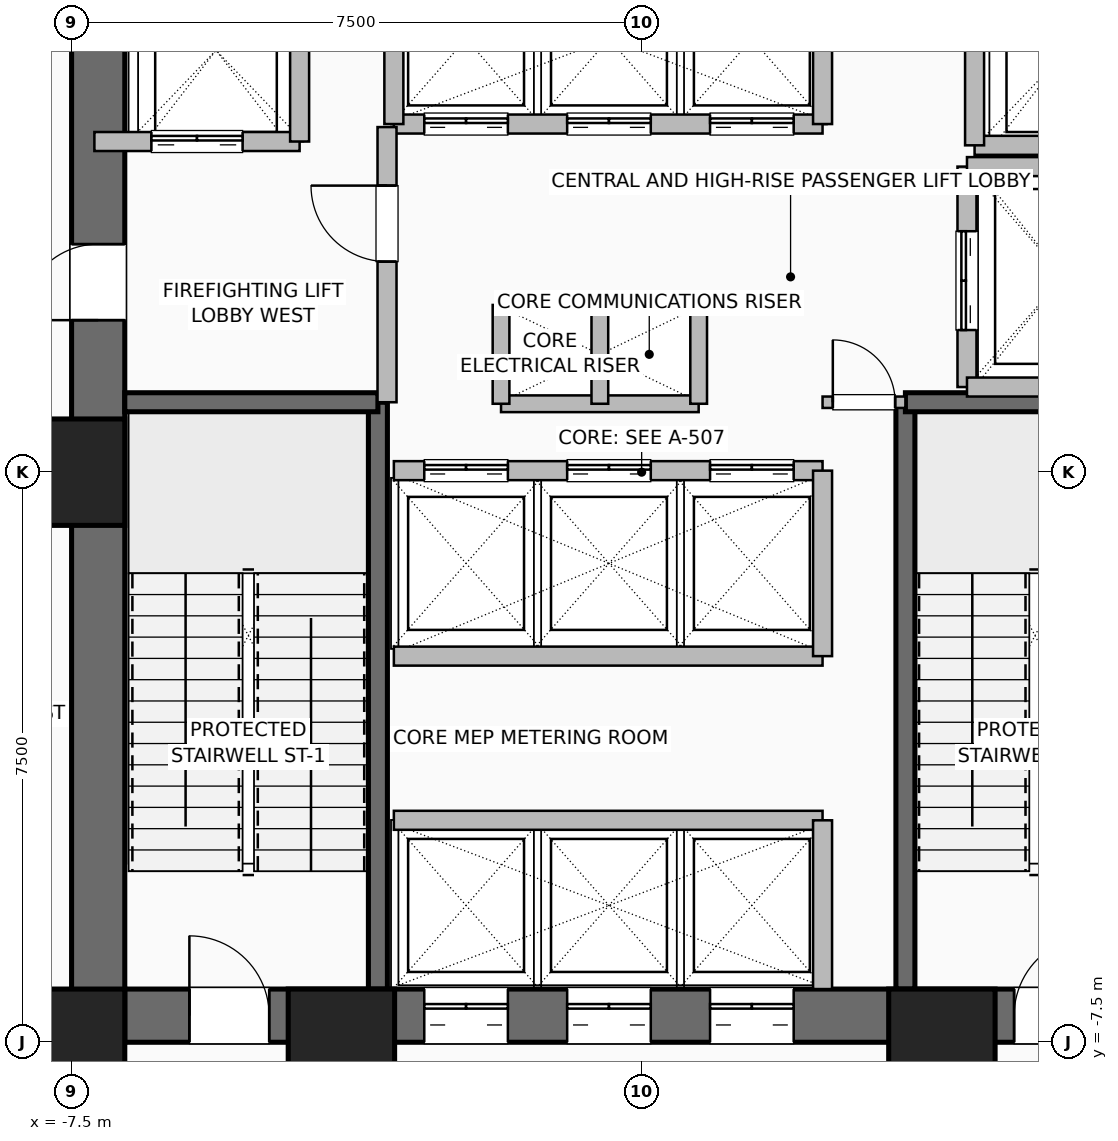
"""IFC4 building model, lengths in metres.
Left out: names, types, materials, properties, quantities, classifications, styles, units other than length and angle.
Written with IfcOpenShell. Run it as: python <this file> out.ifc"""

import sys

from ifc_helpers import new_model, si_unit, direction, frame, frame_2d, origin, origin_2d, place, context, subcontext, project, spatial, rectangle, hollow_rectangle, extrude, element, fill, save


model = new_model("IFC4")
c1 = context("Model", 3, precision=1e-05, world=origin(), true_north=direction((0.0, 1.0)))
c2 = subcontext(c1, "Body", "Model", "MODEL_VIEW")
j1 = project(units=[si_unit("LENGTHUNIT", "METRE"), si_unit("PLANEANGLEUNIT", "RADIAN")], contexts=[c1])
p1 = place(None, origin())
s1 = spatial("IfcSite", under=j1, at=p1, CompositionType="ELEMENT")
p2 = place(p1, origin())
s2 = spatial("IfcBuilding", under=s1, at=p2, CompositionType="ELEMENT")
p3 = place(p2, frame((0.0, 0.0, 21.6)))
s3 = spatial("IfcBuildingStorey", under=s2, at=p3, CompositionType="ELEMENT", Elevation=21.6)
for number, where, z_axis, x_axis in (
    (1, (-7.5, -7.5, 0.0), (0.0, 0.0, 1.0), (1.0, 0.0, 0.0)),
    (2, (-3.95, -7.5, 0.0), (0.0, 0.0, 1.0), (1.0, 0.0, 0.0)),
    (3, (3.95, -7.5, 0.0), (0.0, 0.0, 1.0), (1.0, 0.0, 0.0)),
    (4, (-7.5, 0.0, 0.0), (0.0, 0.0, 1.0), (1.0, 0.0, 0.0)),
):
    element("IfcColumn", number, at=place(p3, frame(where, z_axis=z_axis, x_axis=x_axis)), inside=s3, PredefinedType="COLUMN", context=c2, shape_type="SweptSolid", body=[
        extrude(hollow_rectangle(XDim=1.4, YDim=1.4, WallThickness=0.06, at=origin_2d()), origin(), (0.0, 0.0, 1.0), 5.4),
    ])
p4 = place(p3, frame((-7.5, -7.15, 0.0), z_axis=(0.0, 0.0, 1.0), x_axis=(1.0, 0.0, 0.0)))
e5 = element("IfcWall", 5, at=p4, inside=s3, PredefinedType="SHEAR", context=c2, shape_type="SweptSolid", body=[
    extrude(rectangle(XDim=15.0, YDim=0.7, at=frame_2d((7.5, 0.0))), origin(), (0.0, 0.0, 1.0), 5.0),
])
p5 = place(p4, frame((1.55, 0.0, 0.0)))
e6 = element("IfcOpeningElement", 6, at=p5, cuts=e5, PredefinedType="OPENING", context=c2, shape_type="SweptSolid", body=[
    extrude(rectangle(XDim=1.05, YDim=2.08, at=frame_2d((0.525, 1.04))), frame((0.0, 0.36, 0.0), z_axis=(0.0, -1.0, 0.0), x_axis=(1.0, 0.0, 0.0)), (0.0, 0.0, 1.0), 0.72),
])
p6 = place(p4, frame((12.4, 0.0, 0.0)))
e7 = element("IfcOpeningElement", 7, at=p6, cuts=e5, PredefinedType="OPENING", context=c2, shape_type="SweptSolid", body=[
    extrude(rectangle(XDim=1.05, YDim=2.08, at=frame_2d((0.525, 1.04))), frame((0.0, 0.36, 0.0), z_axis=(0.0, -1.0, 0.0), x_axis=(1.0, 0.0, 0.0)), (0.0, 0.0, 1.0), 0.72),
])
p7 = place(p4, frame((4.64, 0.0, 0.0)))
e8 = element("IfcOpeningElement", 8, at=p7, cuts=e5, PredefinedType="OPENING", context=c2, shape_type="SweptSolid", body=[
    extrude(rectangle(XDim=1.1, YDim=2.2, at=frame_2d((0.55, 1.1))), frame((0.0, 0.36, 0.0), z_axis=(0.0, -1.0, 0.0), x_axis=(1.0, 0.0, 0.0)), (0.0, 0.0, 1.0), 0.72),
])
p8 = place(p4, frame((6.52, 0.0, 0.0)))
e9 = element("IfcOpeningElement", 9, at=p8, cuts=e5, PredefinedType="OPENING", context=c2, shape_type="SweptSolid", body=[
    extrude(rectangle(XDim=1.1, YDim=2.2, at=frame_2d((0.55, 1.1))), frame((0.0, 0.36, 0.0), z_axis=(0.0, -1.0, 0.0), x_axis=(1.0, 0.0, 0.0)), (0.0, 0.0, 1.0), 0.72),
])
p9 = place(p4, frame((8.4, 0.0, 0.0)))
e10 = element("IfcOpeningElement", 10, at=p9, cuts=e5, PredefinedType="OPENING", context=c2, shape_type="SweptSolid", body=[
    extrude(rectangle(XDim=1.1, YDim=2.2, at=frame_2d((0.55, 1.1))), frame((0.0, 0.36, 0.0), z_axis=(0.0, -1.0, 0.0), x_axis=(1.0, 0.0, 0.0)), (0.0, 0.0, 1.0), 0.72),
])
p10 = place(p3, frame((-7.15, -7.5, 0.0), z_axis=(0.0, 0.0, 1.0), x_axis=(0.0, 1.0, 0.0)))
e11 = element("IfcWall", 11, at=p10, inside=s3, PredefinedType="SHEAR", context=c2, shape_type="SweptSolid", body=[
    extrude(rectangle(XDim=15.0, YDim=0.7, at=frame_2d((7.5, 0.0))), origin(), (0.0, 0.0, 1.0), 5.0),
])
p11 = place(p10, frame((9.5, 0.0, 0.0)))
e12 = element("IfcOpeningElement", 12, at=p11, cuts=e11, PredefinedType="OPENING", context=c2, shape_type="SweptSolid", body=[
    extrude(rectangle(XDim=1.0, YDim=2.08, at=frame_2d((0.5, 1.04))), frame((0.0, 0.36, 0.0), z_axis=(0.0, -1.0, 0.0), x_axis=(1.0, 0.0, 0.0)), (0.0, 0.0, 1.0), 0.72),
])
p12 = place(p3, frame((-3.47, -6.8, 0.0), z_axis=(0.0, 0.0, 1.0), x_axis=(0.0, 1.0, 0.0)))
e13 = element("IfcWall", 13, at=p12, inside=s3, PredefinedType="SHEAR", context=c2, shape_type="SweptSolid", body=[
    extrude(rectangle(XDim=7.72, YDim=0.25, at=frame_2d((3.86, 0.0))), origin(), (0.0, 0.0, 1.0), 5.0),
])
p13 = place(p3, frame((-6.8, 0.92, 0.0), z_axis=(0.0, 0.0, 1.0), x_axis=(1.0, 0.0, 0.0)))
e14 = element("IfcWall", 14, at=p13, inside=s3, PredefinedType="SHEAR", context=c2, shape_type="SweptSolid", body=[
    extrude(rectangle(XDim=3.33, YDim=0.25, at=frame_2d((1.665, 0.0))), origin(), (0.0, 0.0, 1.0), 5.0),
])
p14 = place(p3, frame((3.47, -6.8, 0.0), z_axis=(0.0, 0.0, 1.0), x_axis=(0.0, 1.0, 0.0)))
e15 = element("IfcWall", 15, at=p14, inside=s3, PredefinedType="SHEAR", context=c2, shape_type="SweptSolid", body=[
    extrude(rectangle(XDim=7.72, YDim=0.25, at=frame_2d((3.86, 0.0))), origin(), (0.0, 0.0, 1.0), 5.0),
])
p15 = place(p3, frame((3.47, 0.92, 0.0), z_axis=(0.0, 0.0, 1.0), x_axis=(1.0, 0.0, 0.0)))
e16 = element("IfcWall", 16, at=p15, inside=s3, PredefinedType="SHEAR", context=c2, shape_type="SweptSolid", body=[
    extrude(rectangle(XDim=3.33, YDim=0.25, at=frame_2d((1.665, 0.0))), origin(), (0.0, 0.0, 1.0), 5.0),
])
for number, where, z_axis, x_axis in (
    (17, (-1.85, 2.2, 0.0), (0.0, 0.0, 1.0), (1.0, 0.0, 0.0)),
    (18, (-1.85, 0.9, 0.0), (0.0, 0.0, 1.0), (1.0, 0.0, 0.0)),
):
    element("IfcWall", number, at=place(p3, frame(where, z_axis=z_axis, x_axis=x_axis)), inside=s3, PredefinedType="PARTITIONING", context=c2, shape_type="SweptSolid", body=[
        extrude(rectangle(XDim=2.6, YDim=0.22, at=frame_2d((1.3, 0.0))), origin(), (0.0, 0.0, 1.0), 5.0),
    ])
for number, where, z_axis, x_axis in (
    (19, (-0.55, 0.9, 0.0), (0.0, 0.0, 1.0), (0.0, 1.0, 0.0)),
    (20, (0.75, 0.9, 0.0), (0.0, 0.0, 1.0), (0.0, 1.0, 0.0)),
    (21, (-1.85, 0.9, 0.0), (0.0, 0.0, 1.0), (0.0, 1.0, 0.0)),
):
    element("IfcWall", number, at=place(p3, frame(where, z_axis=z_axis, x_axis=x_axis)), inside=s3, PredefinedType="PARTITIONING", context=c2, shape_type="SweptSolid", body=[
        extrude(rectangle(XDim=1.3, YDim=0.22, at=frame_2d((0.65, 0.0))), origin(), (0.0, 0.0, 1.0), 5.0),
    ])
p16 = place(p3, frame((-3.26, -4.58, 0.0), z_axis=(0.0, 0.0, 1.0), x_axis=(1.0, 0.0, 0.0)))
e22 = element("IfcWall", 22, at=p16, inside=s3, PredefinedType="SHEAR", context=c2, shape_type="SweptSolid", body=[
    extrude(rectangle(XDim=5.64, YDim=0.25, at=frame_2d((2.82, 0.0))), origin(), (0.0, 0.0, 1.0), 5.0),
])
p17 = place(p3, frame((2.38, -6.8, 0.0), z_axis=(0.0, 0.0, 1.0), x_axis=(0.0, 1.0, 0.0)))
e23 = element("IfcWall", 23, at=p17, inside=s3, PredefinedType="SHEAR", context=c2, shape_type="SweptSolid", body=[
    extrude(rectangle(XDim=2.22, YDim=0.25, at=frame_2d((1.11, 0.0))), origin(), (0.0, 0.0, 1.0), 5.0),
])
p18 = place(p3, frame((-3.26, 0.02, 0.0), z_axis=(0.0, 0.0, 1.0), x_axis=(1.0, 0.0, 0.0)))
e24 = element("IfcWall", 24, at=p18, inside=s3, PredefinedType="SHEAR", context=c2, shape_type="SweptSolid", body=[
    extrude(rectangle(XDim=5.64, YDim=0.25, at=frame_2d((2.82, 0.0))), origin(), (0.0, 0.0, 1.0), 5.0),
])
p19 = place(p18, frame((0.4, 0.0, 0.0)))
e25 = element("IfcOpeningElement", 25, at=p19, cuts=e24, PredefinedType="OPENING", context=c2, shape_type="SweptSolid", body=[
    extrude(rectangle(XDim=1.1, YDim=2.2, at=frame_2d((0.55, 1.1))), frame((0.0, 0.135, 0.0), z_axis=(0.0, -1.0, 0.0), x_axis=(1.0, 0.0, 0.0)), (0.0, 0.0, 1.0), 0.27),
])
p20 = place(p18, frame((2.28, 0.0, 0.0)))
e26 = element("IfcOpeningElement", 26, at=p20, cuts=e24, PredefinedType="OPENING", context=c2, shape_type="SweptSolid", body=[
    extrude(rectangle(XDim=1.1, YDim=2.2, at=frame_2d((0.55, 1.1))), frame((0.0, 0.135, 0.0), z_axis=(0.0, -1.0, 0.0), x_axis=(1.0, 0.0, 0.0)), (0.0, 0.0, 1.0), 0.27),
])
p21 = place(p18, frame((4.16, 0.0, 0.0)))
e27 = element("IfcOpeningElement", 27, at=p21, cuts=e24, PredefinedType="OPENING", context=c2, shape_type="SweptSolid", body=[
    extrude(rectangle(XDim=1.1, YDim=2.2, at=frame_2d((0.55, 1.1))), frame((0.0, 0.135, 0.0), z_axis=(0.0, -1.0, 0.0), x_axis=(1.0, 0.0, 0.0)), (0.0, 0.0, 1.0), 0.27),
])
p22 = place(p3, frame((-3.26, -2.42, 0.0), z_axis=(0.0, 0.0, 1.0), x_axis=(1.0, 0.0, 0.0)))
e28 = element("IfcWall", 28, at=p22, inside=s3, PredefinedType="SHEAR", context=c2, shape_type="SweptSolid", body=[
    extrude(rectangle(XDim=5.64, YDim=0.25, at=frame_2d((2.82, 0.0))), origin(), (0.0, 0.0, 1.0), 5.0),
])
p23 = place(p3, frame((2.38, -2.42, 0.0), z_axis=(0.0, 0.0, 1.0), x_axis=(0.0, 1.0, 0.0)))
e29 = element("IfcWall", 29, at=p23, inside=s3, PredefinedType="SHEAR", context=c2, shape_type="SweptSolid", body=[
    extrude(rectangle(XDim=2.44, YDim=0.25, at=frame_2d((1.22, 0.0))), origin(), (0.0, 0.0, 1.0), 5.0),
])
p24 = place(p3, frame((-3.26, 4.58, 0.0), z_axis=(0.0, 0.0, 1.0), x_axis=(1.0, 0.0, 0.0)))
e30 = element("IfcWall", 30, at=p24, inside=s3, PredefinedType="SHEAR", context=c2, shape_type="SweptSolid", body=[
    extrude(rectangle(XDim=5.64, YDim=0.25, at=frame_2d((2.82, 0.0))), origin(), (0.0, 0.0, 1.0), 5.0),
])
p25 = place(p24, frame((0.4, 0.0, 0.0)))
e31 = element("IfcOpeningElement", 31, at=p25, cuts=e30, PredefinedType="OPENING", context=c2, shape_type="SweptSolid", body=[
    extrude(rectangle(XDim=1.1, YDim=2.2, at=frame_2d((0.55, 1.1))), frame((0.0, 0.135, 0.0), z_axis=(0.0, -1.0, 0.0), x_axis=(1.0, 0.0, 0.0)), (0.0, 0.0, 1.0), 0.27),
])
p26 = place(p24, frame((2.28, 0.0, 0.0)))
e32 = element("IfcOpeningElement", 32, at=p26, cuts=e30, PredefinedType="OPENING", context=c2, shape_type="SweptSolid", body=[
    extrude(rectangle(XDim=1.1, YDim=2.2, at=frame_2d((0.55, 1.1))), frame((0.0, 0.135, 0.0), z_axis=(0.0, -1.0, 0.0), x_axis=(1.0, 0.0, 0.0)), (0.0, 0.0, 1.0), 0.27),
])
p27 = place(p24, frame((4.16, 0.0, 0.0)))
e33 = element("IfcOpeningElement", 33, at=p27, cuts=e30, PredefinedType="OPENING", context=c2, shape_type="SweptSolid", body=[
    extrude(rectangle(XDim=1.1, YDim=2.2, at=frame_2d((0.55, 1.1))), frame((0.0, 0.135, 0.0), z_axis=(0.0, -1.0, 0.0), x_axis=(1.0, 0.0, 0.0)), (0.0, 0.0, 1.0), 0.27),
])
for number, where, z_axis, x_axis in (
    (34, (-3.26, 4.58, 0.0), (0.0, 0.0, 1.0), (0.0, 1.0, 0.0)),
    (35, (2.38, 4.58, 0.0), (0.0, 0.0, 1.0), (0.0, 1.0, 0.0)),
):
    element("IfcWall", number, at=place(p3, frame(where, z_axis=z_axis, x_axis=x_axis)), inside=s3, PredefinedType="SHEAR", context=c2, shape_type="SweptSolid", body=[
        extrude(rectangle(XDim=2.22, YDim=0.25, at=frame_2d((1.11, 0.0))), origin(), (0.0, 0.0, 1.0), 5.0),
    ])
p28 = place(p3, frame((-7.2, 4.35, 0.0), z_axis=(0.0, 0.0, 1.0), x_axis=(1.0, 0.0, 0.0)))
e36 = element("IfcWall", 36, at=p28, inside=s3, PredefinedType="SHEAR", context=c2, shape_type="SweptSolid", body=[
    extrude(rectangle(XDim=2.7, YDim=0.25, at=frame_2d((1.35, 0.0))), origin(), (0.0, 0.0, 1.0), 5.0),
])
p29 = place(p28, frame((0.75, 0.0, 0.0)))
e37 = element("IfcOpeningElement", 37, at=p29, cuts=e36, PredefinedType="OPENING", context=c2, shape_type="SweptSolid", body=[
    extrude(rectangle(XDim=1.2, YDim=2.2, at=frame_2d((0.6, 1.1))), frame((0.0, 0.135, 0.0), z_axis=(0.0, -1.0, 0.0), x_axis=(1.0, 0.0, 0.0)), (0.0, 0.0, 1.0), 0.27),
])
p30 = place(p3, frame((-4.5, 4.35, 0.0), z_axis=(0.0, 0.0, 1.0), x_axis=(0.0, 1.0, 0.0)))
e38 = element("IfcWall", 38, at=p30, inside=s3, PredefinedType="SHEAR", context=c2, shape_type="SweptSolid", body=[
    extrude(rectangle(XDim=2.85, YDim=0.25, at=frame_2d((1.425, 0.0))), origin(), (0.0, 0.0, 1.0), 5.0),
])
p31 = place(p3, frame((4.38, 4.3, 0.0), z_axis=(0.0, 0.0, 1.0), x_axis=(1.0, 0.0, 0.0)))
e39 = element("IfcWall", 39, at=p31, inside=s3, PredefinedType="SHEAR", context=c2, shape_type="SweptSolid", body=[
    extrude(rectangle(XDim=2.42, YDim=0.25, at=frame_2d((1.21, 0.0))), origin(), (0.0, 0.0, 1.0), 5.0),
])
p32 = place(p3, frame((4.38, 4.3, 0.0), z_axis=(0.0, 0.0, 1.0), x_axis=(0.0, 1.0, 0.0)))
e40 = element("IfcWall", 40, at=p32, inside=s3, PredefinedType="SHEAR", context=c2, shape_type="SweptSolid", body=[
    extrude(rectangle(XDim=2.5, YDim=0.25, at=frame_2d((1.25, 0.0))), origin(), (0.0, 0.0, 1.0), 5.0),
])
p33 = place(p3, frame((4.28, 1.12, 0.0), z_axis=(0.0, 0.0, 1.0), x_axis=(0.0, 1.0, 0.0)))
e41 = element("IfcWall", 41, at=p33, inside=s3, PredefinedType="SHEAR", context=c2, shape_type="SweptSolid", body=[
    extrude(rectangle(XDim=2.9, YDim=0.25, at=frame_2d((1.45, 0.0))), origin(), (0.0, 0.0, 1.0), 5.0),
])
p34 = place(p33, frame((0.75, 0.0, 0.0)))
e42 = element("IfcOpeningElement", 42, at=p34, cuts=e41, PredefinedType="OPENING", context=c2, shape_type="SweptSolid", body=[
    extrude(rectangle(XDim=1.3, YDim=2.3, at=frame_2d((0.65, 1.15))), frame((0.0, 0.135, 0.0), z_axis=(0.0, -1.0, 0.0), x_axis=(1.0, 0.0, 0.0)), (0.0, 0.0, 1.0), 0.27),
])
for number, where, z_axis, x_axis in (
    (43, (4.28, 1.12, 0.0), (0.0, 0.0, 1.0), (1.0, 0.0, 0.0)),
    (44, (4.28, 4.02, 0.0), (0.0, 0.0, 1.0), (1.0, 0.0, 0.0)),
):
    element("IfcWall", number, at=place(p3, frame(where, z_axis=z_axis, x_axis=x_axis)), inside=s3, PredefinedType="SHEAR", context=c2, shape_type="SweptSolid", body=[
        extrude(rectangle(XDim=2.52, YDim=0.25, at=frame_2d((1.26, 0.0))), origin(), (0.0, 0.0, 1.0), 5.0),
    ])
p35 = place(p3, frame((-3.35, 0.92, 0.0), z_axis=(0.0, 0.0, 1.0), x_axis=(0.0, 1.0, 0.0)))
e45 = element("IfcWall", 45, at=p35, inside=s3, PredefinedType="SHEAR", context=c2, shape_type="SweptSolid", body=[
    extrude(rectangle(XDim=3.62, YDim=0.25, at=frame_2d((1.81, 0.0))), origin(), (0.0, 0.0, 1.0), 5.0),
])
p36 = place(p35, frame((1.85, 0.0, 0.0)))
e46 = element("IfcOpeningElement", 46, at=p36, cuts=e45, PredefinedType="OPENING", context=c2, shape_type="SweptSolid", body=[
    extrude(rectangle(XDim=1.0, YDim=2.08, at=frame_2d((0.5, 1.04))), frame((0.0, 0.135, 0.0), z_axis=(0.0, -1.0, 0.0), x_axis=(1.0, 0.0, 0.0)), (0.0, 0.0, 1.0), 0.27),
])
p37 = place(p3, frame((2.38, 0.92, 0.0), z_axis=(0.0, 0.0, 1.0), x_axis=(1.0, 0.0, 0.0)))
e47 = element("IfcWall", 47, at=p37, inside=s3, PredefinedType="PARTITIONING", context=c2, shape_type="SweptSolid", body=[
    extrude(rectangle(XDim=1.09, YDim=0.15, at=frame_2d((0.545, 0.0))), origin(), (0.0, 0.0, 1.0), 5.0),
])
p38 = place(p37, frame((0.135, 0.0, 0.0)))
e48 = element("IfcOpeningElement", 48, at=p38, cuts=e47, PredefinedType="OPENING", context=c2, shape_type="SweptSolid", body=[
    extrude(rectangle(XDim=0.82, YDim=2.05, at=frame_2d((0.41, 1.025))), frame((0.0, 0.085, 0.0), z_axis=(0.0, -1.0, 0.0), x_axis=(1.0, 0.0, 0.0)), (0.0, 0.0, 1.0), 0.17),
])
p39 = place(p5, origin())
e49 = element("IfcDoor", 49, at=p39, inside=s3, OperationType="SINGLE_SWING_LEFT", PredefinedType="DOOR", context=c2, shape_type="SweptSolid", body=[
    extrude(rectangle(XDim=1.05, YDim=2.08, at=frame_2d((0.525, 1.04))), frame((0.0, 0.025, 0.0), z_axis=(0.0, -1.0, 0.0), x_axis=(1.0, 0.0, 0.0)), (0.0, 0.0, 1.0), 0.05),
])
fill(e6, e49)
p40 = place(p6, origin())
e50 = element("IfcDoor", 50, at=p40, inside=s3, OperationType="SINGLE_SWING_RIGHT", PredefinedType="DOOR", context=c2, shape_type="SweptSolid", body=[
    extrude(rectangle(XDim=1.05, YDim=2.08, at=frame_2d((0.525, 1.04))), frame((0.0, 0.025, 0.0), z_axis=(0.0, -1.0, 0.0), x_axis=(1.0, 0.0, 0.0)), (0.0, 0.0, 1.0), 0.05),
])
fill(e7, e50)
p41 = place(p11, origin())
e51 = element("IfcDoor", 51, at=p41, inside=s3, OperationType="SINGLE_SWING_LEFT", PredefinedType="DOOR", context=c2, shape_type="SweptSolid", body=[
    extrude(rectangle(XDim=1.0, YDim=2.08, at=frame_2d((0.5, 1.04))), frame((0.0, 0.025, 0.0), z_axis=(0.0, -1.0, 0.0), x_axis=(1.0, 0.0, 0.0)), (0.0, 0.0, 1.0), 0.05),
])
fill(e12, e51)
p42 = place(p7, origin())
e52 = element("IfcDoor", 52, at=p42, inside=s3, OperationType="DOUBLE_DOOR_SLIDING", PredefinedType="DOOR", context=c2, shape_type="SweptSolid", body=[
    extrude(rectangle(XDim=1.1, YDim=2.2, at=frame_2d((0.55, 1.1))), frame((0.0, 0.025, 0.0), z_axis=(0.0, -1.0, 0.0), x_axis=(1.0, 0.0, 0.0)), (0.0, 0.0, 1.0), 0.05),
])
fill(e8, e52)
p43 = place(p8, origin())
e53 = element("IfcDoor", 53, at=p43, inside=s3, OperationType="DOUBLE_DOOR_SLIDING", PredefinedType="DOOR", context=c2, shape_type="SweptSolid", body=[
    extrude(rectangle(XDim=1.1, YDim=2.2, at=frame_2d((0.55, 1.1))), frame((0.0, 0.025, 0.0), z_axis=(0.0, -1.0, 0.0), x_axis=(1.0, 0.0, 0.0)), (0.0, 0.0, 1.0), 0.05),
])
fill(e9, e53)
p44 = place(p9, origin())
e54 = element("IfcDoor", 54, at=p44, inside=s3, OperationType="DOUBLE_DOOR_SLIDING", PredefinedType="DOOR", context=c2, shape_type="SweptSolid", body=[
    extrude(rectangle(XDim=1.1, YDim=2.2, at=frame_2d((0.55, 1.1))), frame((0.0, 0.025, 0.0), z_axis=(0.0, -1.0, 0.0), x_axis=(1.0, 0.0, 0.0)), (0.0, 0.0, 1.0), 0.05),
])
fill(e10, e54)
p45 = place(p19, origin())
e55 = element("IfcDoor", 55, at=p45, inside=s3, OperationType="DOUBLE_DOOR_SLIDING", PredefinedType="DOOR", context=c2, shape_type="SweptSolid", body=[
    extrude(rectangle(XDim=1.1, YDim=2.2, at=frame_2d((0.55, 1.1))), frame((0.0, 0.025, 0.0), z_axis=(0.0, -1.0, 0.0), x_axis=(1.0, 0.0, 0.0)), (0.0, 0.0, 1.0), 0.05),
])
fill(e25, e55)
p46 = place(p20, origin())
e56 = element("IfcDoor", 56, at=p46, inside=s3, OperationType="DOUBLE_DOOR_SLIDING", PredefinedType="DOOR", context=c2, shape_type="SweptSolid", body=[
    extrude(rectangle(XDim=1.1, YDim=2.2, at=frame_2d((0.55, 1.1))), frame((0.0, 0.025, 0.0), z_axis=(0.0, -1.0, 0.0), x_axis=(1.0, 0.0, 0.0)), (0.0, 0.0, 1.0), 0.05),
])
fill(e26, e56)
p47 = place(p21, origin())
e57 = element("IfcDoor", 57, at=p47, inside=s3, OperationType="DOUBLE_DOOR_SLIDING", PredefinedType="DOOR", context=c2, shape_type="SweptSolid", body=[
    extrude(rectangle(XDim=1.1, YDim=2.2, at=frame_2d((0.55, 1.1))), frame((0.0, 0.025, 0.0), z_axis=(0.0, -1.0, 0.0), x_axis=(1.0, 0.0, 0.0)), (0.0, 0.0, 1.0), 0.05),
])
fill(e27, e57)
p48 = place(p25, origin())
e58 = element("IfcDoor", 58, at=p48, inside=s3, OperationType="DOUBLE_DOOR_SLIDING", PredefinedType="DOOR", context=c2, shape_type="SweptSolid", body=[
    extrude(rectangle(XDim=1.1, YDim=2.2, at=frame_2d((0.55, 1.1))), frame((0.0, 0.025, 0.0), z_axis=(0.0, -1.0, 0.0), x_axis=(1.0, 0.0, 0.0)), (0.0, 0.0, 1.0), 0.05),
])
fill(e31, e58)
p49 = place(p26, origin())
e59 = element("IfcDoor", 59, at=p49, inside=s3, OperationType="DOUBLE_DOOR_SLIDING", PredefinedType="DOOR", context=c2, shape_type="SweptSolid", body=[
    extrude(rectangle(XDim=1.1, YDim=2.2, at=frame_2d((0.55, 1.1))), frame((0.0, 0.025, 0.0), z_axis=(0.0, -1.0, 0.0), x_axis=(1.0, 0.0, 0.0)), (0.0, 0.0, 1.0), 0.05),
])
fill(e32, e59)
p50 = place(p27, origin())
e60 = element("IfcDoor", 60, at=p50, inside=s3, OperationType="DOUBLE_DOOR_SLIDING", PredefinedType="DOOR", context=c2, shape_type="SweptSolid", body=[
    extrude(rectangle(XDim=1.1, YDim=2.2, at=frame_2d((0.55, 1.1))), frame((0.0, 0.025, 0.0), z_axis=(0.0, -1.0, 0.0), x_axis=(1.0, 0.0, 0.0)), (0.0, 0.0, 1.0), 0.05),
])
fill(e33, e60)
p51 = place(p29, origin())
e61 = element("IfcDoor", 61, at=p51, inside=s3, OperationType="DOUBLE_DOOR_SLIDING", PredefinedType="DOOR", context=c2, shape_type="SweptSolid", body=[
    extrude(rectangle(XDim=1.2, YDim=2.2, at=frame_2d((0.6, 1.1))), frame((0.0, 0.025, 0.0), z_axis=(0.0, -1.0, 0.0), x_axis=(1.0, 0.0, 0.0)), (0.0, 0.0, 1.0), 0.05),
])
fill(e37, e61)
p52 = place(p34, origin())
e62 = element("IfcDoor", 62, at=p52, inside=s3, OperationType="DOUBLE_DOOR_SLIDING", PredefinedType="DOOR", context=c2, shape_type="SweptSolid", body=[
    extrude(rectangle(XDim=1.3, YDim=2.3, at=frame_2d((0.65, 1.15))), frame((0.0, 0.025, 0.0), z_axis=(0.0, -1.0, 0.0), x_axis=(1.0, 0.0, 0.0)), (0.0, 0.0, 1.0), 0.05),
])
fill(e42, e62)
p53 = place(p36, origin())
e63 = element("IfcDoor", 63, at=p53, inside=s3, OperationType="SINGLE_SWING_RIGHT", PredefinedType="DOOR", context=c2, shape_type="SweptSolid", body=[
    extrude(rectangle(XDim=1.0, YDim=2.08, at=frame_2d((0.5, 1.04))), frame((0.0, 0.025, 0.0), z_axis=(0.0, -1.0, 0.0), x_axis=(1.0, 0.0, 0.0)), (0.0, 0.0, 1.0), 0.05),
])
fill(e46, e63)
p54 = place(p38, origin())
e64 = element("IfcDoor", 64, at=p54, inside=s3, OperationType="SINGLE_SWING_LEFT", PredefinedType="DOOR", context=c2, shape_type="SweptSolid", body=[
    extrude(rectangle(XDim=0.82, YDim=2.05, at=frame_2d((0.41, 1.025))), frame((0.0, 0.025, 0.0), z_axis=(0.0, -1.0, 0.0), x_axis=(1.0, 0.0, 0.0)), (0.0, 0.0, 1.0), 0.05),
])
fill(e48, e64)
save(model, sys.argv[1])
